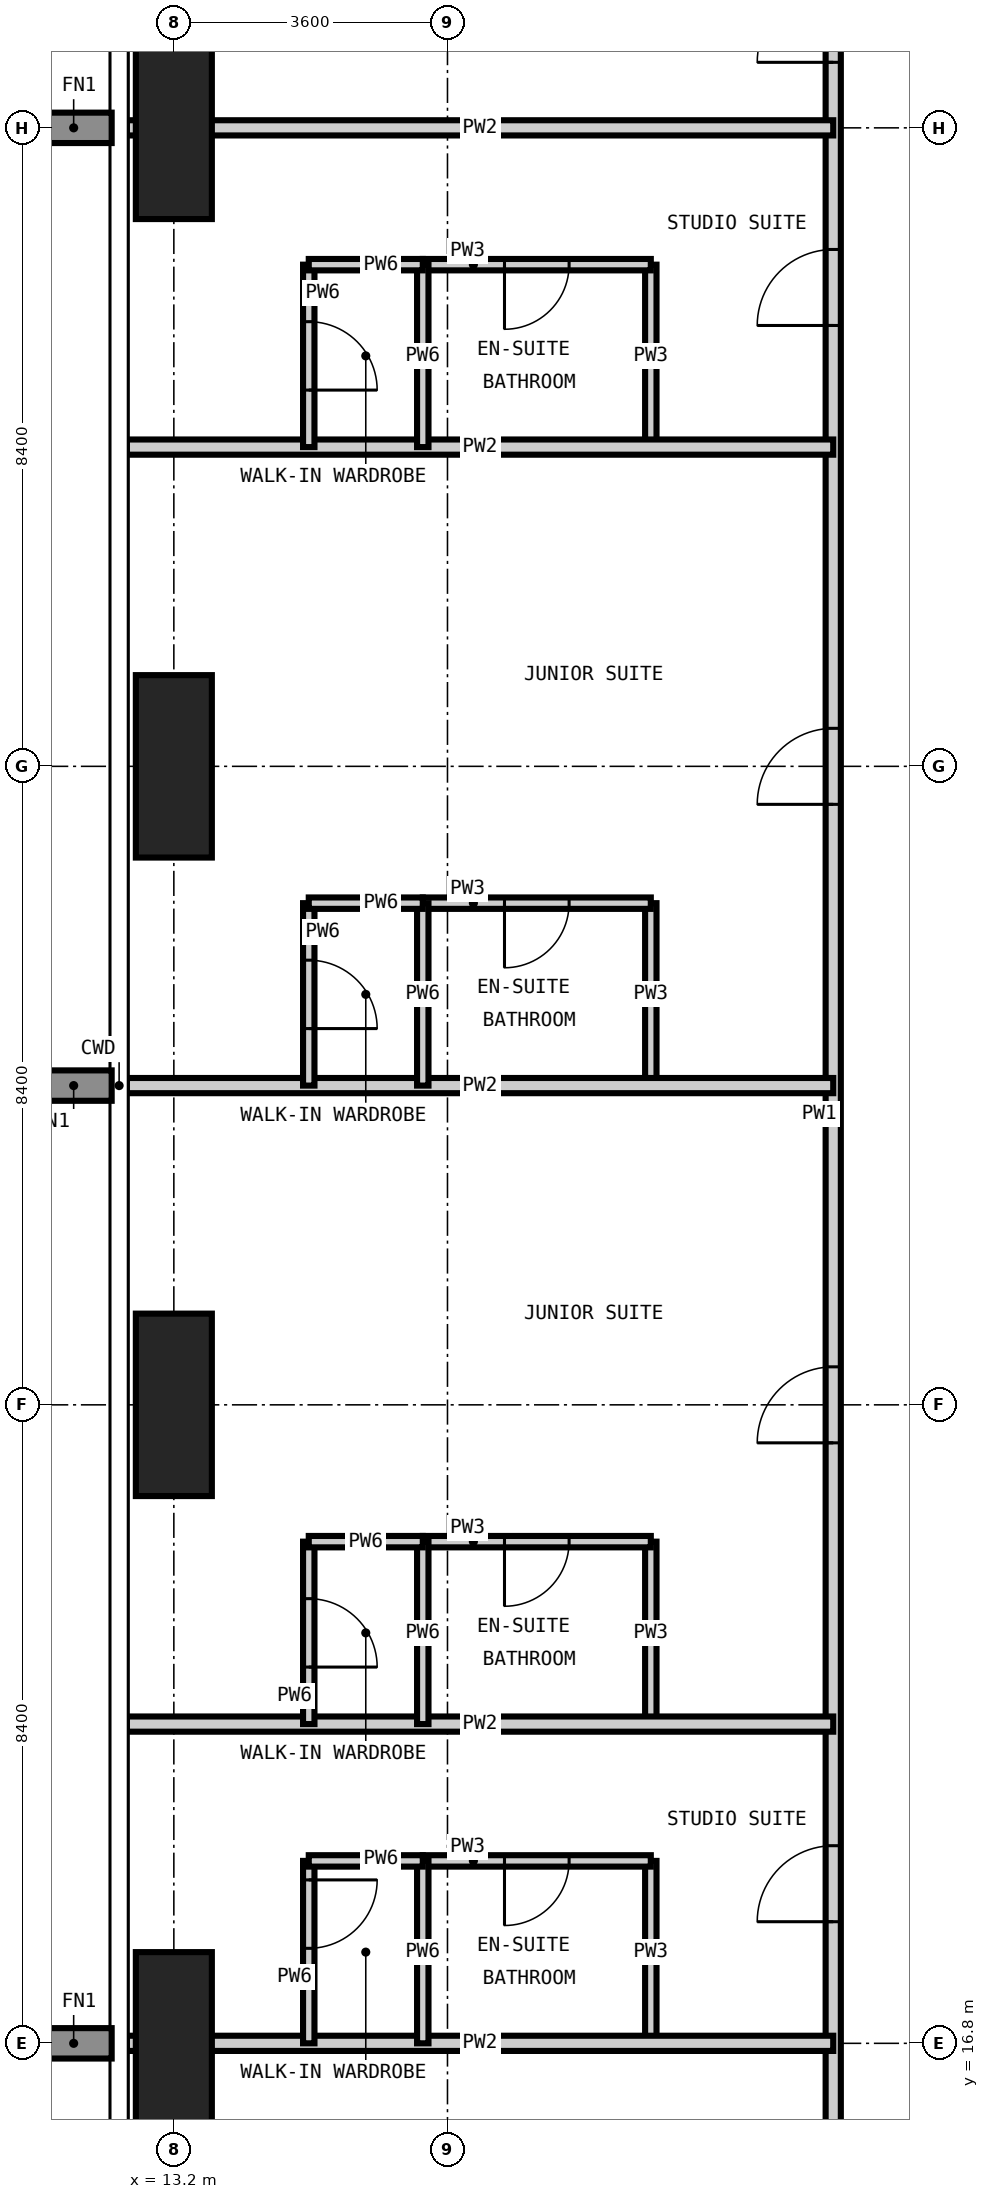
"""IFC4 building model, lengths in metres.
Left out: names, types, materials, properties, quantities, classifications, styles, units other than length and angle.
Written with IfcOpenShell. Run it as: python <this file> out.ifc"""

import sys

from ifc_helpers import new_model, si_unit, direction, frame, frame_2d, origin, origin_2d, place, context, subcontext, project, spatial, rectangle, extrude, element, fill, save


model = new_model("IFC4")
c1 = context("Model", 3, precision=1e-05, world=origin(), true_north=direction((0.0, 1.0)))
c2 = subcontext(c1, "Body", "Model", "MODEL_VIEW")
j1 = project(units=[si_unit("LENGTHUNIT", "METRE"), si_unit("PLANEANGLEUNIT", "RADIAN")], contexts=[c1])
p1 = place(None, origin())
s1 = spatial("IfcSite", under=j1, at=p1, CompositionType="ELEMENT")
p2 = place(p1, origin())
s2 = spatial("IfcBuilding", under=s1, at=p2, CompositionType="ELEMENT")
p3 = place(p2, frame((0.0, 0.0, 276.3)))
s3 = spatial("IfcBuildingStorey", under=s2, at=p3, CompositionType="ELEMENT", Elevation=276.3)
for number, where, z_axis, x_axis in (
    (1, (13.2, 16.8, -0.35), (0.0, 0.0, 1.0), (1.0, 0.0, 0.0)),
    (2, (13.2, 25.2, -0.35), (0.0, 0.0, 1.0), (1.0, 0.0, 0.0)),
    (3, (13.2, 33.6, -0.35), (0.0, 0.0, 1.0), (1.0, 0.0, 0.0)),
    (4, (13.2, 42.0, -0.35), (0.0, 0.0, 1.0), (1.0, 0.0, 0.0)),
):
    element("IfcColumn", number, at=place(p3, frame(where, z_axis=z_axis, x_axis=x_axis)), inside=s3, PredefinedType="COLUMN", context=c2, shape_type="SweptSolid", body=[
        extrude(rectangle(XDim=1.0, YDim=2.4, at=origin_2d()), origin(), (0.0, 0.0, 1.0), 3.9),
    ])
for number, where, z_axis, x_axis in (
    (5, (19.475, 16.8, 0.0), (0.0, 0.0, 1.0), (0.0, 1.0, 0.0)),
    (6, (19.475, 21.0, 0.0), (0.0, 0.0, 1.0), (0.0, 1.0, 0.0)),
):
    element("IfcWall", number, at=place(p3, frame(where, z_axis=z_axis, x_axis=x_axis)), inside=s3, PredefinedType="PARTITIONING", context=c2, shape_type="SweptSolid", body=[
        extrude(rectangle(XDim=2.4, YDim=0.15, at=frame_2d((1.2, 0.0))), origin(), (0.0, 0.0, 1.0), 3.55),
    ])
p4 = place(p3, frame((19.475, 29.4, 0.0), z_axis=(0.0, 0.0, 1.0), x_axis=(0.0, 1.0, 0.0)))
e7 = element("IfcWall", 7, at=p4, inside=s3, PredefinedType="PARTITIONING", context=c2, shape_type="SweptSolid", body=[
    extrude(rectangle(XDim=2.4, YDim=0.15, at=frame_2d((1.2, 0.0))), origin(), (0.0, 0.0, 1.0), 3.55),
])
p5 = place(p3, frame((19.475, 37.8, 0.0), z_axis=(0.0, 0.0, 1.0), x_axis=(0.0, 1.0, 0.0)))
e8 = element("IfcWall", 8, at=p5, inside=s3, PredefinedType="PARTITIONING", context=c2, shape_type="SweptSolid", body=[
    extrude(rectangle(XDim=2.4, YDim=0.15, at=frame_2d((1.2, 0.0))), origin(), (0.0, 0.0, 1.0), 3.55),
])
p6 = place(p3, frame((16.475, 19.2, 0.0), z_axis=(0.0, 0.0, 1.0), x_axis=(1.0, 0.0, 0.0)))
e9 = element("IfcWall", 9, at=p6, inside=s3, PredefinedType="PARTITIONING", context=c2, shape_type="SweptSolid", body=[
    extrude(rectangle(XDim=3.0, YDim=0.15, at=frame_2d((1.5, 0.0))), origin(), (0.0, 0.0, 1.0), 3.55),
])
p7 = place(p6, frame((1.075, 0.0, 0.0)))
e10 = element("IfcOpeningElement", 10, at=p7, cuts=e9, PredefinedType="OPENING", context=c2, shape_type="SweptSolid", body=[
    extrude(rectangle(XDim=0.85, YDim=2.1, at=frame_2d((0.425, 1.05))), frame((0.0, 0.085, 0.0), z_axis=(0.0, -1.0, 0.0), x_axis=(1.0, 0.0, 0.0)), (0.0, 0.0, 1.0), 0.17),
])
p8 = place(p3, frame((16.475, 23.4, 0.0), z_axis=(0.0, 0.0, 1.0), x_axis=(1.0, 0.0, 0.0)))
e11 = element("IfcWall", 11, at=p8, inside=s3, PredefinedType="PARTITIONING", context=c2, shape_type="SweptSolid", body=[
    extrude(rectangle(XDim=3.0, YDim=0.15, at=frame_2d((1.5, 0.0))), origin(), (0.0, 0.0, 1.0), 3.55),
])
p9 = place(p8, frame((1.075, 0.0, 0.0)))
e12 = element("IfcOpeningElement", 12, at=p9, cuts=e11, PredefinedType="OPENING", context=c2, shape_type="SweptSolid", body=[
    extrude(rectangle(XDim=0.85, YDim=2.1, at=frame_2d((0.425, 1.05))), frame((0.0, 0.085, 0.0), z_axis=(0.0, -1.0, 0.0), x_axis=(1.0, 0.0, 0.0)), (0.0, 0.0, 1.0), 0.17),
])
p10 = place(p3, frame((16.475, 31.8, 0.0), z_axis=(0.0, 0.0, 1.0), x_axis=(1.0, 0.0, 0.0)))
e13 = element("IfcWall", 13, at=p10, inside=s3, PredefinedType="PARTITIONING", context=c2, shape_type="SweptSolid", body=[
    extrude(rectangle(XDim=3.0, YDim=0.15, at=frame_2d((1.5, 0.0))), origin(), (0.0, 0.0, 1.0), 3.55),
])
p11 = place(p10, frame((1.075, 0.0, 0.0)))
e14 = element("IfcOpeningElement", 14, at=p11, cuts=e13, PredefinedType="OPENING", context=c2, shape_type="SweptSolid", body=[
    extrude(rectangle(XDim=0.85, YDim=2.1, at=frame_2d((0.425, 1.05))), frame((0.0, 0.085, 0.0), z_axis=(0.0, -1.0, 0.0), x_axis=(1.0, 0.0, 0.0)), (0.0, 0.0, 1.0), 0.17),
])
p12 = place(p3, frame((16.475, 40.2, 0.0), z_axis=(0.0, 0.0, 1.0), x_axis=(1.0, 0.0, 0.0)))
e15 = element("IfcWall", 15, at=p12, inside=s3, PredefinedType="PARTITIONING", context=c2, shape_type="SweptSolid", body=[
    extrude(rectangle(XDim=3.0, YDim=0.15, at=frame_2d((1.5, 0.0))), origin(), (0.0, 0.0, 1.0), 3.55),
])
p13 = place(p12, frame((1.075, 0.0, 0.0)))
e16 = element("IfcOpeningElement", 16, at=p13, cuts=e15, PredefinedType="OPENING", context=c2, shape_type="SweptSolid", body=[
    extrude(rectangle(XDim=0.85, YDim=2.1, at=frame_2d((0.425, 1.05))), frame((0.0, 0.085, 0.0), z_axis=(0.0, -1.0, 0.0), x_axis=(1.0, 0.0, 0.0)), (0.0, 0.0, 1.0), 0.17),
])
p14 = place(p3, frame((21.875, 13.475, 0.0), z_axis=(0.0, 0.0, 1.0), x_axis=(0.0, 1.0, 0.0)))
e17 = element("IfcWall", 17, at=p14, inside=s3, PredefinedType="PARTITIONING", context=c2, shape_type="SweptSolid", body=[
    extrude(rectangle(XDim=31.25, YDim=0.2, at=frame_2d((15.625, 0.0))), origin(), (0.0, 0.0, 1.0), 3.55),
])
p15 = place(p14, frame((4.925, 0.0, 0.0)))
e18 = element("IfcOpeningElement", 18, at=p15, cuts=e17, PredefinedType="OPENING", context=c2, shape_type="SweptSolid", body=[
    extrude(rectangle(XDim=1.0, YDim=2.2, at=frame_2d((0.5, 1.1))), frame((0.0, 0.11, 0.0), z_axis=(0.0, -1.0, 0.0), x_axis=(1.0, 0.0, 0.0)), (0.0, 0.0, 1.0), 0.22),
])
p16 = place(p14, frame((11.225, 0.0, 0.0)))
e19 = element("IfcOpeningElement", 19, at=p16, cuts=e17, PredefinedType="OPENING", context=c2, shape_type="SweptSolid", body=[
    extrude(rectangle(XDim=1.0, YDim=2.2, at=frame_2d((0.5, 1.1))), frame((0.0, 0.11, 0.0), z_axis=(0.0, -1.0, 0.0), x_axis=(1.0, 0.0, 0.0)), (0.0, 0.0, 1.0), 0.22),
])
p17 = place(p14, frame((19.625, 0.0, 0.0)))
e20 = element("IfcOpeningElement", 20, at=p17, cuts=e17, PredefinedType="OPENING", context=c2, shape_type="SweptSolid", body=[
    extrude(rectangle(XDim=1.0, YDim=2.2, at=frame_2d((0.5, 1.1))), frame((0.0, 0.11, 0.0), z_axis=(0.0, -1.0, 0.0), x_axis=(1.0, 0.0, 0.0)), (0.0, 0.0, 1.0), 0.22),
])
p18 = place(p14, frame((25.925, 0.0, 0.0)))
e21 = element("IfcOpeningElement", 21, at=p18, cuts=e17, PredefinedType="OPENING", context=c2, shape_type="SweptSolid", body=[
    extrude(rectangle(XDim=1.0, YDim=2.2, at=frame_2d((0.5, 1.1))), frame((0.0, 0.11, 0.0), z_axis=(0.0, -1.0, 0.0), x_axis=(1.0, 0.0, 0.0)), (0.0, 0.0, 1.0), 0.22),
])
p19 = place(p14, frame((1.162, 0.0, 0.0)))
e22 = element("IfcOpeningElement", 22, at=p19, cuts=e17, PredefinedType="OPENING", context=c2, shape_type="SweptSolid", body=[
    extrude(rectangle(XDim=1.0, YDim=2.2, at=frame_2d((0.5, 1.1))), frame((0.0, 0.11, 0.0), z_axis=(0.0, -1.0, 0.0), x_axis=(1.0, 0.0, 0.0)), (0.0, 0.0, 1.0), 0.22),
])
p20 = place(p14, frame((29.387, 0.0, 0.0)))
e23 = element("IfcOpeningElement", 23, at=p20, cuts=e17, PredefinedType="OPENING", context=c2, shape_type="SweptSolid", body=[
    extrude(rectangle(XDim=1.0, YDim=2.2, at=frame_2d((0.5, 1.1))), frame((0.0, 0.11, 0.0), z_axis=(0.0, -1.0, 0.0), x_axis=(1.0, 0.0, 0.0)), (0.0, 0.0, 1.0), 0.22),
])
for number, where, z_axis, x_axis in (
    (24, (12.582, 16.8, 0.0), (0.0, 0.0, 1.0), (1.0, 0.0, 0.0)),
    (25, (12.582, 21.0, 0.0), (0.0, 0.0, 1.0), (1.0, 0.0, 0.0)),
    (26, (12.582, 29.4, 0.0), (0.0, 0.0, 1.0), (1.0, 0.0, 0.0)),
    (27, (12.582, 37.8, 0.0), (0.0, 0.0, 1.0), (1.0, 0.0, 0.0)),
    (28, (12.582, 42.0, 0.0), (0.0, 0.0, 1.0), (1.0, 0.0, 0.0)),
):
    element("IfcWall", number, at=place(p3, frame(where, z_axis=z_axis, x_axis=x_axis)), inside=s3, PredefinedType="PARTITIONING", context=c2, shape_type="SweptSolid", body=[
        extrude(rectangle(XDim=9.293, YDim=0.2, at=frame_2d((4.646, 0.0))), origin(), (0.0, 0.0, 1.0), 3.55),
    ])
p21 = place(p3, frame((14.975, 16.8, 0.0), z_axis=(0.0, 0.0, 1.0), x_axis=(0.0, 1.0, 0.0)))
e29 = element("IfcWall", 29, at=p21, inside=s3, PredefinedType="PARTITIONING", context=c2, shape_type="SweptSolid", body=[
    extrude(rectangle(XDim=2.4, YDim=0.15, at=frame_2d((1.2, 0.0))), origin(), (0.0, 0.0, 1.0), 3.55),
])
p22 = place(p21, frame((1.25, 0.0, 0.0)))
e30 = element("IfcOpeningElement", 30, at=p22, cuts=e29, PredefinedType="OPENING", context=c2, shape_type="SweptSolid", body=[
    extrude(rectangle(XDim=0.9, YDim=2.1, at=frame_2d((0.45, 1.05))), frame((0.0, 0.085, 0.0), z_axis=(0.0, -1.0, 0.0), x_axis=(1.0, 0.0, 0.0)), (0.0, 0.0, 1.0), 0.17),
])
p23 = place(p3, frame((14.975, 21.0, 0.0), z_axis=(0.0, 0.0, 1.0), x_axis=(0.0, 1.0, 0.0)))
e31 = element("IfcWall", 31, at=p23, inside=s3, PredefinedType="PARTITIONING", context=c2, shape_type="SweptSolid", body=[
    extrude(rectangle(XDim=2.4, YDim=0.15, at=frame_2d((1.2, 0.0))), origin(), (0.0, 0.0, 1.0), 3.55),
])
p24 = place(p23, frame((0.75, 0.0, 0.0)))
e32 = element("IfcOpeningElement", 32, at=p24, cuts=e31, PredefinedType="OPENING", context=c2, shape_type="SweptSolid", body=[
    extrude(rectangle(XDim=0.9, YDim=2.1, at=frame_2d((0.45, 1.05))), frame((0.0, 0.085, 0.0), z_axis=(0.0, -1.0, 0.0), x_axis=(1.0, 0.0, 0.0)), (0.0, 0.0, 1.0), 0.17),
])
p25 = place(p3, frame((14.975, 29.4, 0.0), z_axis=(0.0, 0.0, 1.0), x_axis=(0.0, 1.0, 0.0)))
e33 = element("IfcWall", 33, at=p25, inside=s3, PredefinedType="PARTITIONING", context=c2, shape_type="SweptSolid", body=[
    extrude(rectangle(XDim=2.4, YDim=0.15, at=frame_2d((1.2, 0.0))), origin(), (0.0, 0.0, 1.0), 3.55),
])
p26 = place(p25, frame((0.75, 0.0, 0.0)))
e34 = element("IfcOpeningElement", 34, at=p26, cuts=e33, PredefinedType="OPENING", context=c2, shape_type="SweptSolid", body=[
    extrude(rectangle(XDim=0.9, YDim=2.1, at=frame_2d((0.45, 1.05))), frame((0.0, 0.085, 0.0), z_axis=(0.0, -1.0, 0.0), x_axis=(1.0, 0.0, 0.0)), (0.0, 0.0, 1.0), 0.17),
])
p27 = place(p3, frame((14.975, 37.8, 0.0), z_axis=(0.0, 0.0, 1.0), x_axis=(0.0, 1.0, 0.0)))
e35 = element("IfcWall", 35, at=p27, inside=s3, PredefinedType="PARTITIONING", context=c2, shape_type="SweptSolid", body=[
    extrude(rectangle(XDim=2.4, YDim=0.15, at=frame_2d((1.2, 0.0))), origin(), (0.0, 0.0, 1.0), 3.55),
])
p28 = place(p27, frame((0.75, 0.0, 0.0)))
e36 = element("IfcOpeningElement", 36, at=p28, cuts=e35, PredefinedType="OPENING", context=c2, shape_type="SweptSolid", body=[
    extrude(rectangle(XDim=0.9, YDim=2.1, at=frame_2d((0.45, 1.05))), frame((0.0, 0.085, 0.0), z_axis=(0.0, -1.0, 0.0), x_axis=(1.0, 0.0, 0.0)), (0.0, 0.0, 1.0), 0.17),
])
for number, where, z_axis, x_axis in (
    (37, (16.475, 16.8, 0.0), (0.0, 0.0, 1.0), (0.0, 1.0, 0.0)),
    (38, (16.475, 21.0, 0.0), (0.0, 0.0, 1.0), (0.0, 1.0, 0.0)),
):
    element("IfcWall", number, at=place(p3, frame(where, z_axis=z_axis, x_axis=x_axis)), inside=s3, PredefinedType="PARTITIONING", context=c2, shape_type="SweptSolid", body=[
        extrude(rectangle(XDim=2.4, YDim=0.15, at=frame_2d((1.2, 0.0))), origin(), (0.0, 0.0, 1.0), 3.55),
    ])
p29 = place(p3, frame((16.475, 29.4, 0.0), z_axis=(0.0, 0.0, 1.0), x_axis=(0.0, 1.0, 0.0)))
e39 = element("IfcWall", 39, at=p29, inside=s3, PredefinedType="PARTITIONING", context=c2, shape_type="SweptSolid", body=[
    extrude(rectangle(XDim=2.4, YDim=0.15, at=frame_2d((1.2, 0.0))), origin(), (0.0, 0.0, 1.0), 3.55),
])
p30 = place(p3, frame((16.475, 37.8, 0.0), z_axis=(0.0, 0.0, 1.0), x_axis=(0.0, 1.0, 0.0)))
e40 = element("IfcWall", 40, at=p30, inside=s3, PredefinedType="PARTITIONING", context=c2, shape_type="SweptSolid", body=[
    extrude(rectangle(XDim=2.4, YDim=0.15, at=frame_2d((1.2, 0.0))), origin(), (0.0, 0.0, 1.0), 3.55),
])
for number, where, z_axis, x_axis in (
    (41, (14.975, 19.2, 0.0), (0.0, 0.0, 1.0), (1.0, 0.0, 0.0)),
    (42, (14.975, 23.4, 0.0), (0.0, 0.0, 1.0), (1.0, 0.0, 0.0)),
    (43, (14.975, 31.8, 0.0), (0.0, 0.0, 1.0), (1.0, 0.0, 0.0)),
    (44, (14.975, 40.2, 0.0), (0.0, 0.0, 1.0), (1.0, 0.0, 0.0)),
):
    element("IfcWall", number, at=place(p3, frame(where, z_axis=z_axis, x_axis=x_axis)), inside=s3, PredefinedType="PARTITIONING", context=c2, shape_type="SweptSolid", body=[
        extrude(rectangle(XDim=1.5, YDim=0.15, at=frame_2d((0.75, 0.0))), origin(), (0.0, 0.0, 1.0), 3.55),
    ])
p31 = place(p15, origin())
e45 = element("IfcDoor", 45, at=p31, inside=s3, OperationType="SINGLE_SWING_LEFT", PredefinedType="DOOR", context=c2, shape_type="SweptSolid", body=[
    extrude(rectangle(XDim=1.0, YDim=2.2, at=frame_2d((0.5, 1.1))), frame((0.0, 0.025, 0.0), z_axis=(0.0, -1.0, 0.0), x_axis=(1.0, 0.0, 0.0)), (0.0, 0.0, 1.0), 0.05),
])
fill(e18, e45)
p32 = place(p7, frame((0.85, 0.0, 0.0), z_axis=(0.0, 0.0, 1.0), x_axis=(-1.0, 0.0, 0.0)))
e46 = element("IfcDoor", 46, at=p32, inside=s3, OperationType="SINGLE_SWING_RIGHT", PredefinedType="DOOR", context=c2, shape_type="SweptSolid", body=[
    extrude(rectangle(XDim=0.85, YDim=2.1, at=frame_2d((0.425, 1.05))), frame((0.0, 0.025, 0.0), z_axis=(0.0, -1.0, 0.0), x_axis=(1.0, 0.0, 0.0)), (0.0, 0.0, 1.0), 0.05),
])
fill(e10, e46)
p33 = place(p22, frame((0.9, 0.0, 0.0), z_axis=(0.0, 0.0, 1.0), x_axis=(-1.0, 0.0, 0.0)))
e47 = element("IfcDoor", 47, at=p33, inside=s3, OperationType="SINGLE_SWING_LEFT", PredefinedType="DOOR", context=c2, shape_type="SweptSolid", body=[
    extrude(rectangle(XDim=0.9, YDim=2.1, at=frame_2d((0.45, 1.05))), frame((0.0, 0.025, 0.0), z_axis=(0.0, -1.0, 0.0), x_axis=(1.0, 0.0, 0.0)), (0.0, 0.0, 1.0), 0.05),
])
fill(e30, e47)
p34 = place(p16, origin())
e48 = element("IfcDoor", 48, at=p34, inside=s3, OperationType="SINGLE_SWING_LEFT", PredefinedType="DOOR", context=c2, shape_type="SweptSolid", body=[
    extrude(rectangle(XDim=1.0, YDim=2.2, at=frame_2d((0.5, 1.1))), frame((0.0, 0.025, 0.0), z_axis=(0.0, -1.0, 0.0), x_axis=(1.0, 0.0, 0.0)), (0.0, 0.0, 1.0), 0.05),
])
fill(e19, e48)
p35 = place(p9, frame((0.85, 0.0, 0.0), z_axis=(0.0, 0.0, 1.0), x_axis=(-1.0, 0.0, 0.0)))
e49 = element("IfcDoor", 49, at=p35, inside=s3, OperationType="SINGLE_SWING_RIGHT", PredefinedType="DOOR", context=c2, shape_type="SweptSolid", body=[
    extrude(rectangle(XDim=0.85, YDim=2.1, at=frame_2d((0.425, 1.05))), frame((0.0, 0.025, 0.0), z_axis=(0.0, -1.0, 0.0), x_axis=(1.0, 0.0, 0.0)), (0.0, 0.0, 1.0), 0.05),
])
fill(e12, e49)
p36 = place(p24, frame((0.9, 0.0, 0.0), z_axis=(0.0, 0.0, 1.0), x_axis=(-1.0, 0.0, 0.0)))
e50 = element("IfcDoor", 50, at=p36, inside=s3, OperationType="SINGLE_SWING_RIGHT", PredefinedType="DOOR", context=c2, shape_type="SweptSolid", body=[
    extrude(rectangle(XDim=0.9, YDim=2.1, at=frame_2d((0.45, 1.05))), frame((0.0, 0.025, 0.0), z_axis=(0.0, -1.0, 0.0), x_axis=(1.0, 0.0, 0.0)), (0.0, 0.0, 1.0), 0.05),
])
fill(e32, e50)
p37 = place(p17, origin())
e51 = element("IfcDoor", 51, at=p37, inside=s3, OperationType="SINGLE_SWING_LEFT", PredefinedType="DOOR", context=c2, shape_type="SweptSolid", body=[
    extrude(rectangle(XDim=1.0, YDim=2.2, at=frame_2d((0.5, 1.1))), frame((0.0, 0.025, 0.0), z_axis=(0.0, -1.0, 0.0), x_axis=(1.0, 0.0, 0.0)), (0.0, 0.0, 1.0), 0.05),
])
fill(e20, e51)
p38 = place(p11, frame((0.85, 0.0, 0.0), z_axis=(0.0, 0.0, 1.0), x_axis=(-1.0, 0.0, 0.0)))
e52 = element("IfcDoor", 52, at=p38, inside=s3, OperationType="SINGLE_SWING_RIGHT", PredefinedType="DOOR", context=c2, shape_type="SweptSolid", body=[
    extrude(rectangle(XDim=0.85, YDim=2.1, at=frame_2d((0.425, 1.05))), frame((0.0, 0.025, 0.0), z_axis=(0.0, -1.0, 0.0), x_axis=(1.0, 0.0, 0.0)), (0.0, 0.0, 1.0), 0.05),
])
fill(e14, e52)
p39 = place(p26, frame((0.9, 0.0, 0.0), z_axis=(0.0, 0.0, 1.0), x_axis=(-1.0, 0.0, 0.0)))
e53 = element("IfcDoor", 53, at=p39, inside=s3, OperationType="SINGLE_SWING_RIGHT", PredefinedType="DOOR", context=c2, shape_type="SweptSolid", body=[
    extrude(rectangle(XDim=0.9, YDim=2.1, at=frame_2d((0.45, 1.05))), frame((0.0, 0.025, 0.0), z_axis=(0.0, -1.0, 0.0), x_axis=(1.0, 0.0, 0.0)), (0.0, 0.0, 1.0), 0.05),
])
fill(e34, e53)
p40 = place(p18, origin())
e54 = element("IfcDoor", 54, at=p40, inside=s3, OperationType="SINGLE_SWING_LEFT", PredefinedType="DOOR", context=c2, shape_type="SweptSolid", body=[
    extrude(rectangle(XDim=1.0, YDim=2.2, at=frame_2d((0.5, 1.1))), frame((0.0, 0.025, 0.0), z_axis=(0.0, -1.0, 0.0), x_axis=(1.0, 0.0, 0.0)), (0.0, 0.0, 1.0), 0.05),
])
fill(e21, e54)
p41 = place(p13, frame((0.85, 0.0, 0.0), z_axis=(0.0, 0.0, 1.0), x_axis=(-1.0, 0.0, 0.0)))
e55 = element("IfcDoor", 55, at=p41, inside=s3, OperationType="SINGLE_SWING_RIGHT", PredefinedType="DOOR", context=c2, shape_type="SweptSolid", body=[
    extrude(rectangle(XDim=0.85, YDim=2.1, at=frame_2d((0.425, 1.05))), frame((0.0, 0.025, 0.0), z_axis=(0.0, -1.0, 0.0), x_axis=(1.0, 0.0, 0.0)), (0.0, 0.0, 1.0), 0.05),
])
fill(e16, e55)
p42 = place(p28, frame((0.9, 0.0, 0.0), z_axis=(0.0, 0.0, 1.0), x_axis=(-1.0, 0.0, 0.0)))
e56 = element("IfcDoor", 56, at=p42, inside=s3, OperationType="SINGLE_SWING_RIGHT", PredefinedType="DOOR", context=c2, shape_type="SweptSolid", body=[
    extrude(rectangle(XDim=0.9, YDim=2.1, at=frame_2d((0.45, 1.05))), frame((0.0, 0.025, 0.0), z_axis=(0.0, -1.0, 0.0), x_axis=(1.0, 0.0, 0.0)), (0.0, 0.0, 1.0), 0.05),
])
fill(e36, e56)
p43 = place(p20, origin())
e57 = element("IfcDoor", 57, at=p43, inside=s3, OperationType="SINGLE_SWING_LEFT", PredefinedType="DOOR", context=c2, shape_type="SweptSolid", body=[
    extrude(rectangle(XDim=1.0, YDim=2.2, at=frame_2d((0.5, 1.1))), frame((0.0, 0.025, 0.0), z_axis=(0.0, -1.0, 0.0), x_axis=(1.0, 0.0, 0.0)), (0.0, 0.0, 1.0), 0.05),
])
fill(e23, e57)
save(model, sys.argv[1])
